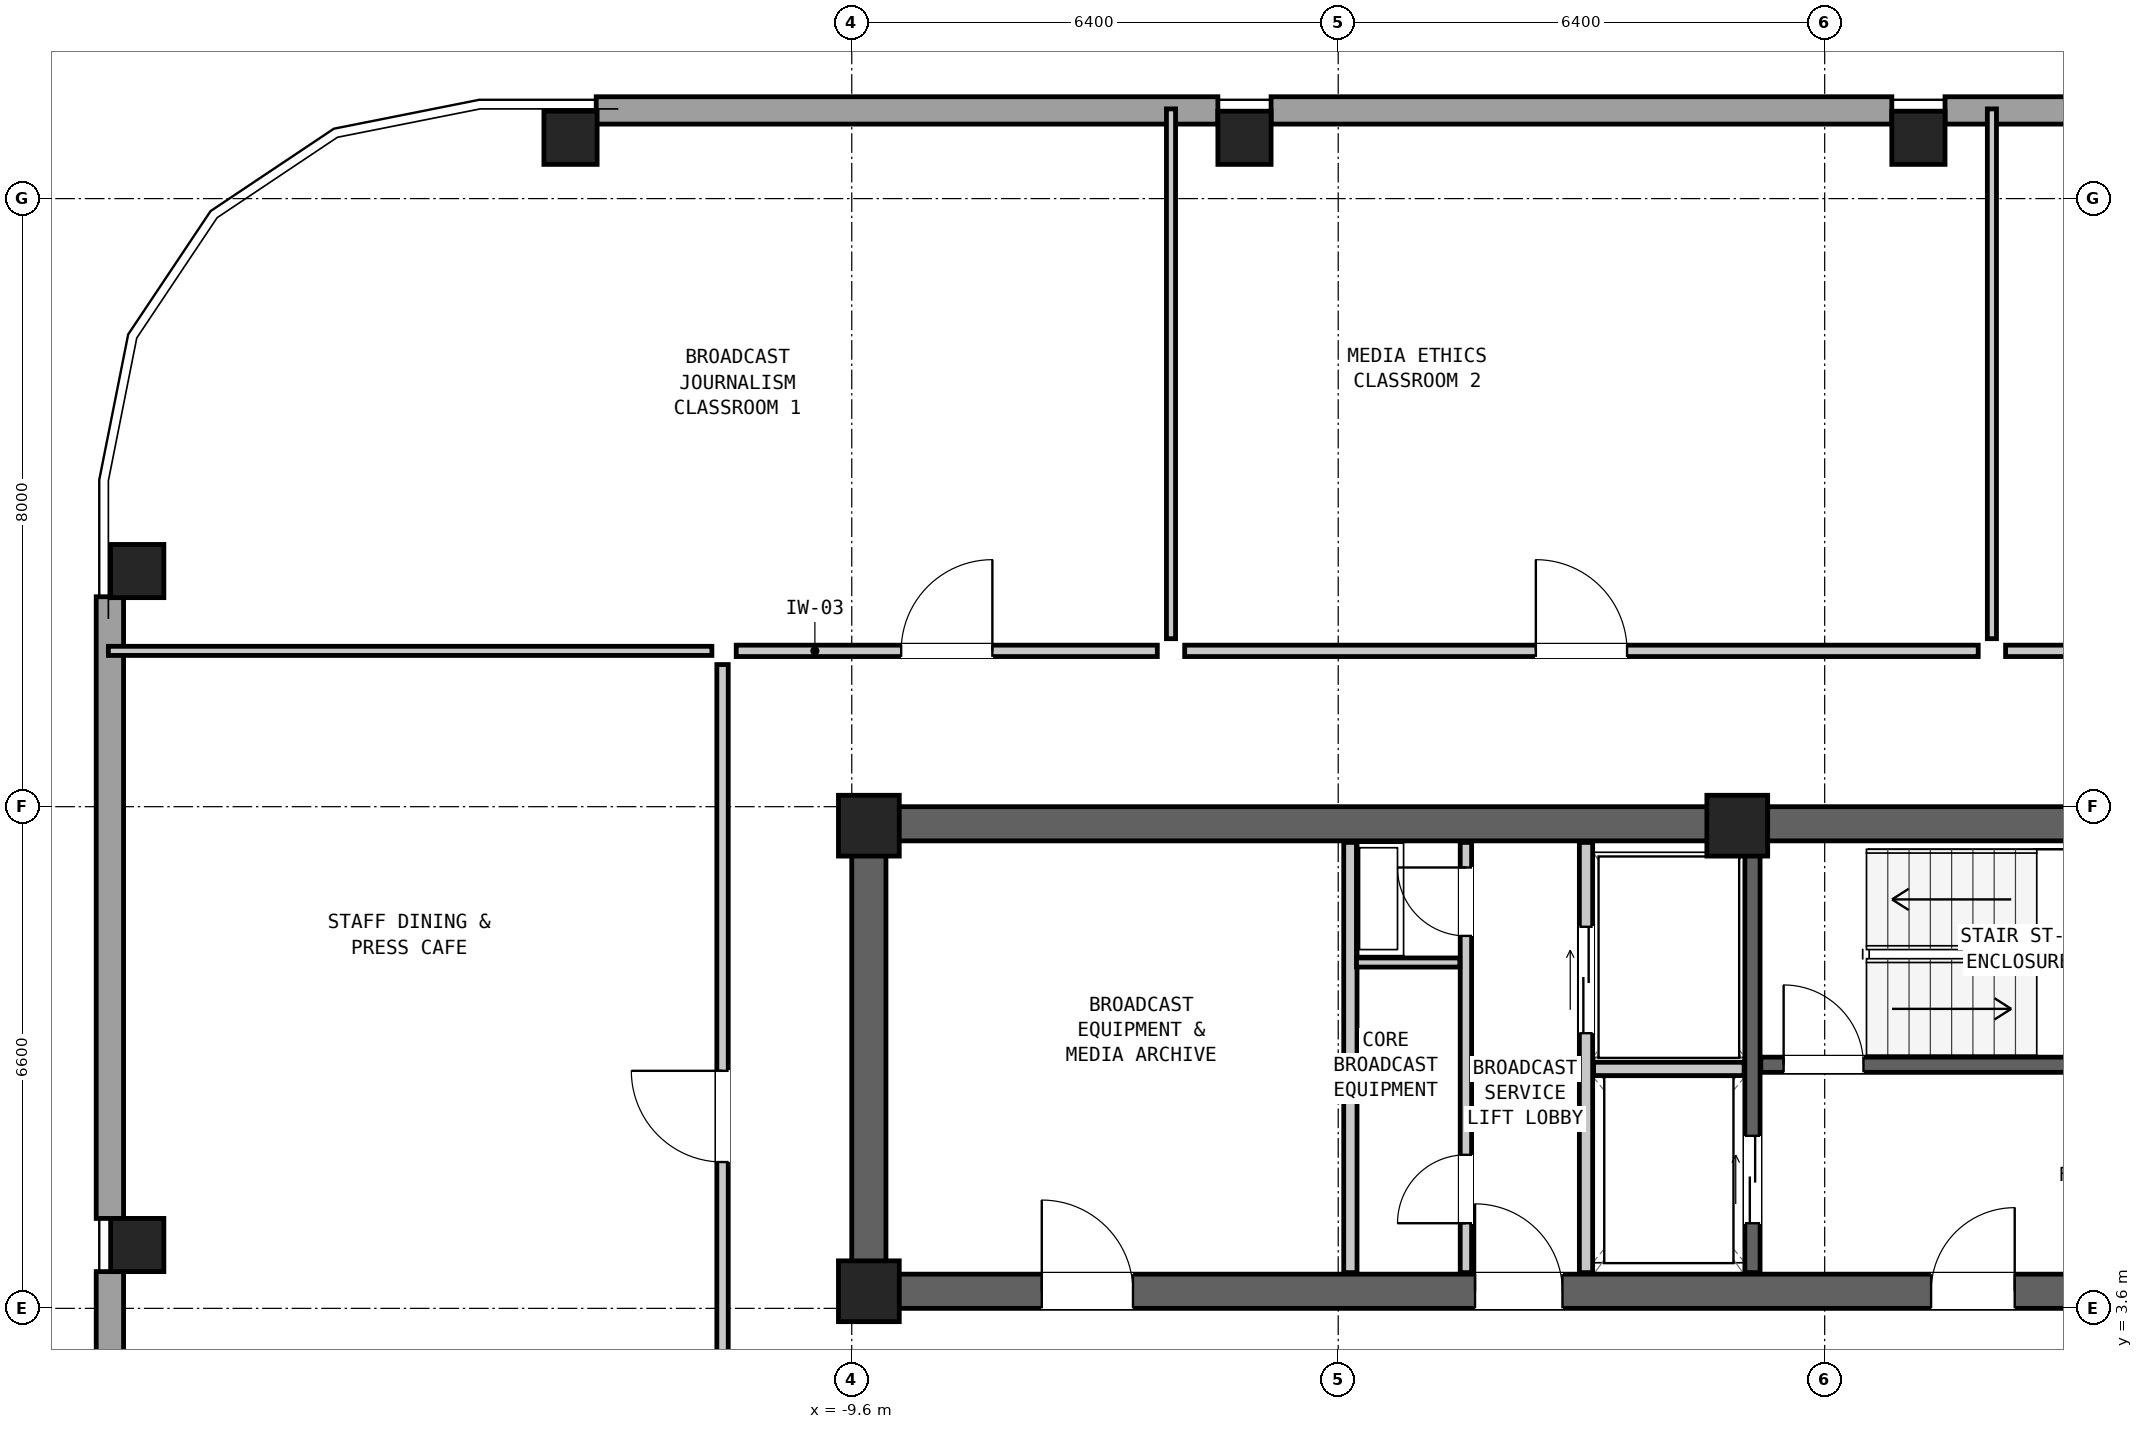
"""IFC4 building model, lengths in metres.
Left out: names, types, materials, properties, quantities, classifications, styles, units other than length and angle.
Written with IfcOpenShell. Run it as: python <this file> out.ifc"""

import sys

from ifc_helpers import new_model, si_unit, direction, frame, frame_2d, origin, origin_2d, place, context, subcontext, project, spatial, rectangle, hollow_rectangle, extrude, element, fill, save


model = new_model("IFC4")
c1 = context("Model", 3, precision=1e-05, world=origin(), true_north=direction((0.0, 1.0)))
c2 = subcontext(c1, "Body", "Model", "MODEL_VIEW")
j1 = project(units=[si_unit("LENGTHUNIT", "METRE"), si_unit("PLANEANGLEUNIT", "RADIAN")], contexts=[c1])
p1 = place(None, origin())
s1 = spatial("IfcSite", under=j1, at=p1, CompositionType="ELEMENT")
p2 = place(p1, origin())
s2 = spatial("IfcBuilding", under=s1, at=p2, CompositionType="ELEMENT")
p3 = place(p2, frame((0.0, 0.0, 223.9)))
s3 = spatial("IfcBuildingStorey", under=s2, at=p3, CompositionType="ELEMENT", Elevation=223.9)
p4 = place(p3, frame((-9.6, 9.975, 0.0), z_axis=(0.0, 0.0, 1.0), x_axis=(1.0, 0.0, 0.0)))
e1 = element("IfcWall", 1, at=p4, inside=s3, PredefinedType="SHEAR", context=c2, shape_type="SweptSolid", body=[
    extrude(rectangle(XDim=19.2, YDim=0.45, at=frame_2d((9.6, 0.0))), origin(), (0.0, 0.0, 1.0), 3.05),
])
p5 = place(p3, frame((-9.6, 3.825, 0.0), z_axis=(0.0, 0.0, 1.0), x_axis=(1.0, 0.0, 0.0)))
e2 = element("IfcWall", 2, at=p5, inside=s3, PredefinedType="SHEAR", context=c2, shape_type="SweptSolid", body=[
    extrude(rectangle(XDim=19.2, YDim=0.45, at=frame_2d((9.6, 0.0))), origin(), (0.0, 0.0, 1.0), 3.05),
])
p6 = place(p5, frame((14.2, 0.0, 0.0)))
e3 = element("IfcOpeningElement", 3, at=p6, cuts=e2, PredefinedType="OPENING", context=c2, shape_type="SweptSolid", body=[
    extrude(rectangle(XDim=1.1, YDim=2.08, at=frame_2d((0.55, 1.04))), frame((0.0, 0.237, 0.0), z_axis=(0.0, -1.0, 0.0), x_axis=(1.0, 0.0, 0.0)), (0.0, 0.0, 1.0), 0.474),
])
p7 = place(p5, frame((8.2, 0.0, 0.0)))
e4 = element("IfcOpeningElement", 4, at=p7, cuts=e2, PredefinedType="OPENING", context=c2, shape_type="SweptSolid", body=[
    extrude(rectangle(XDim=1.15, YDim=2.1, at=frame_2d((0.575, 1.05))), frame((0.0, 0.237, 0.0), z_axis=(0.0, -1.0, 0.0), x_axis=(1.0, 0.0, 0.0)), (0.0, 0.0, 1.0), 0.474),
])
p8 = place(p5, frame((2.5, 0.0, 0.0)))
e5 = element("IfcOpeningElement", 5, at=p8, cuts=e2, PredefinedType="OPENING", context=c2, shape_type="SweptSolid", body=[
    extrude(rectangle(XDim=1.2, YDim=2.1, at=frame_2d((0.6, 1.05))), frame((0.0, 0.237, 0.0), z_axis=(0.0, -1.0, 0.0), x_axis=(1.0, 0.0, 0.0)), (0.0, 0.0, 1.0), 0.474),
])
p9 = place(p3, frame((-9.375, 3.6, 0.0), z_axis=(0.0, 0.0, 1.0), x_axis=(0.0, 1.0, 0.0)))
e6 = element("IfcWall", 6, at=p9, inside=s3, PredefinedType="SHEAR", context=c2, shape_type="SweptSolid", body=[
    extrude(rectangle(XDim=6.6, YDim=0.45, at=frame_2d((3.3, 0.0))), origin(), (0.0, 0.0, 1.0), 3.05),
])
for number, where, z_axis, x_axis in (
    (7, (4.433, 19.0, 0.0), (0.0, 0.0, 1.0), (1.0, 0.0, 0.0)),
    (8, (-4.433, 19.0, 0.0), (0.0, 0.0, 1.0), (1.0, 0.0, 0.0)),
    (9, (-13.3, 19.0, 0.0), (0.0, 0.0, 1.0), (1.0, 0.0, 0.0)),
    (10, (-19.0, 13.3, 0.0), (0.0, 0.0, 1.0), (0.0, 1.0, 0.0)),
    (11, (-19.0, 4.433, 0.0), (0.0, 0.0, 1.0), (0.0, 1.0, 0.0)),
):
    element("IfcColumn", number, at=place(p3, frame(where, z_axis=z_axis, x_axis=x_axis)), inside=s3, PredefinedType="COLUMN", context=c2, shape_type="SweptSolid", body=[
        extrude(hollow_rectangle(XDim=0.7, YDim=0.7, WallThickness=0.045, at=origin_2d()), origin(), (0.0, 0.0, 1.0), 3.05),
    ])
for number, where, z_axis, x_axis in (
    (12, (-9.375, 9.95, 0.0), (0.0, 0.0, 1.0), (1.0, 0.0, 0.0)),
    (13, (2.05, 9.95, 0.0), (0.0, 0.0, 1.0), (1.0, 0.0, 0.0)),
    (14, (-9.375, 3.825, 0.0), (0.0, 0.0, 1.0), (1.0, 0.0, 0.0)),
):
    element("IfcColumn", number, at=place(p3, frame(where, z_axis=z_axis, x_axis=x_axis)), inside=s3, PredefinedType="COLUMN", context=c2, shape_type="SweptSolid", body=[
        extrude(rectangle(XDim=0.8, YDim=0.8, at=origin_2d()), origin(), (0.0, 0.0, 1.0), 3.05),
    ])
p10 = place(p3, frame((-12.962, 19.36, 0.0), z_axis=(0.0, 0.0, 1.0), x_axis=(1.0, 0.0, 0.0)))
e15 = element("IfcWall", 15, at=p10, inside=s3, PredefinedType="SOLIDWALL", context=c2, shape_type="SweptSolid", body=[
    extrude(rectangle(XDim=8.179, YDim=0.36, at=frame_2d((4.089, 0.0))), origin(), (0.0, 0.0, 1.0), 0.98),
])
p11 = place(p3, frame((-4.083, 19.36, 0.0), z_axis=(0.0, 0.0, 1.0), x_axis=(1.0, 0.0, 0.0)))
e16 = element("IfcWall", 16, at=p11, inside=s3, PredefinedType="SOLIDWALL", context=c2, shape_type="SweptSolid", body=[
    extrude(rectangle(XDim=8.167, YDim=0.36, at=frame_2d((4.083, 0.0))), origin(), (0.0, 0.0, 1.0), 0.98),
])
p12 = place(p3, frame((4.783, 19.36, 0.0), z_axis=(0.0, 0.0, 1.0), x_axis=(1.0, 0.0, 0.0)))
e17 = element("IfcWall", 17, at=p12, inside=s3, PredefinedType="SOLIDWALL", context=c2, shape_type="SweptSolid", body=[
    extrude(rectangle(XDim=8.179, YDim=0.36, at=frame_2d((4.089, 0.0))), origin(), (0.0, 0.0, 1.0), 0.98),
])
p13 = place(p3, frame((-19.36, -4.083, 0.0), z_axis=(0.0, 0.0, 1.0), x_axis=(0.0, 1.0, 0.0)))
e18 = element("IfcWall", 18, at=p13, inside=s3, PredefinedType="SOLIDWALL", context=c2, shape_type="SweptSolid", body=[
    extrude(rectangle(XDim=8.167, YDim=0.36, at=frame_2d((4.083, 0.0))), origin(), (0.0, 0.0, 1.0), 0.98),
])
p14 = place(p3, frame((-19.36, 4.783, 0.0), z_axis=(0.0, 0.0, 1.0), x_axis=(0.0, 1.0, 0.0)))
e19 = element("IfcWall", 19, at=p14, inside=s3, PredefinedType="SOLIDWALL", context=c2, shape_type="SweptSolid", body=[
    extrude(rectangle(XDim=8.179, YDim=0.36, at=frame_2d((4.089, 0.0))), origin(), (0.0, 0.0, 1.0), 0.98),
])
p15 = place(p3, frame((2.36, 6.805, 0.0), z_axis=(0.0, 0.0, 1.0), x_axis=(1.0, 0.0, 0.0)))
e20 = element("IfcWall", 20, at=p15, inside=s3, PredefinedType="SHEAR", context=c2, shape_type="SweptSolid", body=[
    extrude(rectangle(XDim=6.77, YDim=0.2, at=frame_2d((3.385, 0.0))), origin(), (0.0, 0.0, 1.0), 2.86),
])
p16 = place(p15, frame((0.3, 0.0, 0.0)))
e21 = element("IfcOpeningElement", 21, at=p16, cuts=e20, PredefinedType="OPENING", context=c2, shape_type="SweptSolid", body=[
    extrude(rectangle(XDim=1.05, YDim=2.08, at=frame_2d((0.525, 1.04))), frame((0.0, 0.112, 0.0), z_axis=(0.0, -1.0, 0.0), x_axis=(1.0, 0.0, 0.0)), (0.0, 0.0, 1.0), 0.224),
])
p17 = place(p3, frame((2.25, 4.07, 0.0), z_axis=(0.0, 0.0, 1.0), x_axis=(0.0, 1.0, 0.0)))
e22 = element("IfcWall", 22, at=p17, inside=s3, PredefinedType="SHEAR", context=c2, shape_type="SweptSolid", body=[
    extrude(rectangle(XDim=5.66, YDim=0.2, at=frame_2d((2.83, 0.0))), origin(), (0.0, 0.0, 1.0), 2.86),
])
p18 = place(p17, frame((0.65, 0.0, 0.0)))
e23 = element("IfcOpeningElement", 23, at=p18, cuts=e22, PredefinedType="OPENING", context=c2, shape_type="SweptSolid", body=[
    extrude(rectangle(XDim=1.15, YDim=2.08, at=frame_2d((0.575, 1.04))), frame((0.0, 0.112, 0.0), z_axis=(0.0, -1.0, 0.0), x_axis=(1.0, 0.0, 0.0)), (0.0, 0.0, 1.0), 0.224),
])
p19 = place(p3, frame((0.06, 4.07, 0.0), z_axis=(0.0, 0.0, 1.0), x_axis=(0.0, 1.0, 0.0)))
e24 = element("IfcWall", 24, at=p19, inside=s3, PredefinedType="PARTITIONING", context=c2, shape_type="SweptSolid", body=[
    extrude(rectangle(XDim=5.66, YDim=0.175, at=frame_2d((2.83, 0.0))), origin(), (0.0, 0.0, 1.0), 2.86),
])
p20 = place(p19, frame((3.15, 0.0, 0.0)))
e25 = element("IfcOpeningElement", 25, at=p20, cuts=e24, PredefinedType="OPENING", context=c2, shape_type="SweptSolid", body=[
    extrude(rectangle(XDim=1.4, YDim=2.12, at=frame_2d((0.7, 1.06))), frame((0.0, 0.1, 0.0), z_axis=(0.0, -1.0, 0.0), x_axis=(1.0, 0.0, 0.0)), (0.0, 0.0, 1.0), 0.199),
])
p21 = place(p3, frame((0.16, 6.75, 0.0), z_axis=(0.0, 0.0, 1.0), x_axis=(1.0, 0.0, 0.0)))
e26 = element("IfcWall", 26, at=p21, inside=s3, PredefinedType="PARTITIONING", context=c2, shape_type="SweptSolid", body=[
    extrude(rectangle(XDim=1.98, YDim=0.175, at=frame_2d((0.99, 0.0))), origin(), (0.0, 0.0, 1.0), 2.86),
])
p22 = place(p3, frame((-3.04, 4.07, 0.0), z_axis=(0.0, 0.0, 1.0), x_axis=(0.0, 1.0, 0.0)))
e27 = element("IfcWall", 27, at=p22, inside=s3, PredefinedType="PARTITIONING", context=c2, shape_type="SweptSolid", body=[
    extrude(rectangle(XDim=5.66, YDim=0.175, at=frame_2d((2.83, 0.0))), origin(), (0.0, 0.0, 1.0), 2.86),
])
p23 = place(p3, frame((-1.52, 4.07, 0.0), z_axis=(0.0, 0.0, 1.0), x_axis=(0.0, 1.0, 0.0)))
e28 = element("IfcWall", 28, at=p23, inside=s3, PredefinedType="PARTITIONING", context=c2, shape_type="SweptSolid", body=[
    extrude(rectangle(XDim=5.66, YDim=0.15, at=frame_2d((2.83, 0.0))), origin(), (0.0, 0.0, 1.0), 2.86),
])
p24 = place(p23, frame((4.43, 0.0, 0.0)))
e29 = element("IfcOpeningElement", 29, at=p24, cuts=e28, PredefinedType="OPENING", context=c2, shape_type="SweptSolid", body=[
    extrude(rectangle(XDim=0.9, YDim=2.05, at=frame_2d((0.45, 1.025))), frame((0.0, 0.087, 0.0), z_axis=(0.0, -1.0, 0.0), x_axis=(1.0, 0.0, 0.0)), (0.0, 0.0, 1.0), 0.174),
])
p25 = place(p23, frame((0.65, 0.0, 0.0)))
e30 = element("IfcOpeningElement", 30, at=p25, cuts=e28, PredefinedType="OPENING", context=c2, shape_type="SweptSolid", body=[
    extrude(rectangle(XDim=0.9, YDim=2.05, at=frame_2d((0.45, 1.025))), frame((0.0, 0.087, 0.0), z_axis=(0.0, -1.0, 0.0), x_axis=(1.0, 0.0, 0.0)), (0.0, 0.0, 1.0), 0.174),
])
p26 = place(p3, frame((-2.96, 8.15, 0.0), z_axis=(0.0, 0.0, 1.0), x_axis=(1.0, 0.0, 0.0)))
e31 = element("IfcWall", 31, at=p26, inside=s3, PredefinedType="PARTITIONING", context=c2, shape_type="SweptSolid", body=[
    extrude(rectangle(XDim=1.36, YDim=0.12, at=frame_2d((0.68, 0.0))), origin(), (0.0, 0.0, 1.0), 2.86),
])
p27 = place(p3, frame((-19.38, 12.25, 0.0), z_axis=(0.0, 0.0, 1.0), x_axis=(1.0, 0.0, 0.0)))
e32 = element("IfcWall", 32, at=p27, inside=s3, PredefinedType="PARTITIONING", context=c2, shape_type="SweptSolid", body=[
    extrude(rectangle(XDim=7.94, YDim=0.12, at=frame_2d((3.97, 0.0))), origin(), (0.0, 0.0, 1.0), 2.86),
])
for number, where, z_axis, x_axis in (
    (33, (-5.4, 12.41, 0.0), (0.0, 0.0, 1.0), (0.0, 1.0, 0.0)),
    (34, (5.4, 12.41, 0.0), (0.0, 0.0, 1.0), (0.0, 1.0, 0.0)),
):
    element("IfcWall", number, at=place(p3, frame(where, z_axis=z_axis, x_axis=x_axis)), inside=s3, PredefinedType="PARTITIONING", context=c2, shape_type="SweptSolid", body=[
        extrude(rectangle(XDim=6.97, YDim=0.12, at=frame_2d((3.485, 0.0))), origin(), (0.0, 0.0, 1.0), 2.86),
    ])
p28 = place(p3, frame((-11.12, 12.25, 0.0), z_axis=(0.0, 0.0, 1.0), x_axis=(1.0, 0.0, 0.0)))
e35 = element("IfcWall", 35, at=p28, inside=s3, PredefinedType="PARTITIONING", context=c2, shape_type="SweptSolid", body=[
    extrude(rectangle(XDim=5.54, YDim=0.15, at=frame_2d((2.77, 0.0))), origin(), (0.0, 0.0, 1.0), 2.86),
])
p29 = place(p28, frame((2.17, 0.0, 0.0)))
e36 = element("IfcOpeningElement", 36, at=p29, cuts=e35, PredefinedType="OPENING", context=c2, shape_type="SweptSolid", body=[
    extrude(rectangle(XDim=1.2, YDim=2.1, at=frame_2d((0.6, 1.05))), frame((0.0, 0.087, 0.0), z_axis=(0.0, -1.0, 0.0), x_axis=(1.0, 0.0, 0.0)), (0.0, 0.0, 1.0), 0.174),
])
p30 = place(p3, frame((-5.22, 12.25, 0.0), z_axis=(0.0, 0.0, 1.0), x_axis=(1.0, 0.0, 0.0)))
e37 = element("IfcWall", 37, at=p30, inside=s3, PredefinedType="PARTITIONING", context=c2, shape_type="SweptSolid", body=[
    extrude(rectangle(XDim=10.44, YDim=0.15, at=frame_2d((5.22, 0.0))), origin(), (0.0, 0.0, 1.0), 2.86),
])
p31 = place(p30, frame((4.62, 0.0, 0.0)))
e38 = element("IfcOpeningElement", 38, at=p31, cuts=e37, PredefinedType="OPENING", context=c2, shape_type="SweptSolid", body=[
    extrude(rectangle(XDim=1.2, YDim=2.1, at=frame_2d((0.6, 1.05))), frame((0.0, 0.087, 0.0), z_axis=(0.0, -1.0, 0.0), x_axis=(1.0, 0.0, 0.0)), (0.0, 0.0, 1.0), 0.174),
])
p32 = place(p3, frame((5.58, 12.25, 0.0), z_axis=(0.0, 0.0, 1.0), x_axis=(1.0, 0.0, 0.0)))
e39 = element("IfcWall", 39, at=p32, inside=s3, PredefinedType="PARTITIONING", context=c2, shape_type="SweptSolid", body=[
    extrude(rectangle(XDim=5.89, YDim=0.15, at=frame_2d((2.945, 0.0))), origin(), (0.0, 0.0, 1.0), 2.86),
])
p33 = place(p32, frame((2.145, 0.0, 0.0)))
e40 = element("IfcOpeningElement", 40, at=p33, cuts=e39, PredefinedType="OPENING", context=c2, shape_type="SweptSolid", body=[
    extrude(rectangle(XDim=1.2, YDim=2.1, at=frame_2d((0.6, 1.05))), frame((0.0, 0.087, 0.0), z_axis=(0.0, -1.0, 0.0), x_axis=(1.0, 0.0, 0.0)), (0.0, 0.0, 1.0), 0.174),
])
p34 = place(p3, frame((-11.3, 0.18, 0.0), z_axis=(0.0, 0.0, 1.0), x_axis=(0.0, 1.0, 0.0)))
e41 = element("IfcWall", 41, at=p34, inside=s3, PredefinedType="PARTITIONING", context=c2, shape_type="SweptSolid", body=[
    extrude(rectangle(XDim=11.89, YDim=0.15, at=frame_2d((5.945, 0.0))), origin(), (0.0, 0.0, 1.0), 2.86),
])
p35 = place(p34, frame((5.345, 0.0, 0.0)))
e42 = element("IfcOpeningElement", 42, at=p35, cuts=e41, PredefinedType="OPENING", context=c2, shape_type="SweptSolid", body=[
    extrude(rectangle(XDim=1.2, YDim=2.1, at=frame_2d((0.6, 1.05))), frame((0.0, 0.087, 0.0), z_axis=(0.0, -1.0, 0.0), x_axis=(1.0, 0.0, 0.0)), (0.0, 0.0, 1.0), 0.174),
])
p36 = place(p16, origin())
e43 = element("IfcDoor", 43, at=p36, inside=s3, OperationType="SINGLE_SWING_LEFT", PredefinedType="DOOR", context=c2, shape_type="SweptSolid", body=[
    extrude(rectangle(XDim=1.05, YDim=2.08, at=frame_2d((0.525, 1.04))), frame((0.0, 0.025, 0.0), z_axis=(0.0, -1.0, 0.0), x_axis=(1.0, 0.0, 0.0)), (0.0, 0.0, 1.0), 0.05),
])
fill(e21, e43)
p37 = place(p6, origin())
e44 = element("IfcDoor", 44, at=p37, inside=s3, OperationType="SINGLE_SWING_RIGHT", PredefinedType="DOOR", context=c2, shape_type="SweptSolid", body=[
    extrude(rectangle(XDim=1.1, YDim=2.08, at=frame_2d((0.55, 1.04))), frame((0.0, 0.025, 0.0), z_axis=(0.0, -1.0, 0.0), x_axis=(1.0, 0.0, 0.0)), (0.0, 0.0, 1.0), 0.05),
])
fill(e3, e44)
p38 = place(p18, origin())
e45 = element("IfcDoor", 45, at=p38, inside=s3, OperationType="DOUBLE_DOOR_SLIDING", PredefinedType="DOOR", context=c2, shape_type="SweptSolid", body=[
    extrude(rectangle(XDim=1.15, YDim=2.08, at=frame_2d((0.575, 1.04))), frame((0.0, 0.025, 0.0), z_axis=(0.0, -1.0, 0.0), x_axis=(1.0, 0.0, 0.0)), (0.0, 0.0, 1.0), 0.05),
])
fill(e23, e45)
p39 = place(p20, origin())
e46 = element("IfcDoor", 46, at=p39, inside=s3, OperationType="DOUBLE_DOOR_SLIDING", PredefinedType="DOOR", context=c2, shape_type="SweptSolid", body=[
    extrude(rectangle(XDim=1.4, YDim=2.12, at=frame_2d((0.7, 1.06))), frame((0.0, 0.025, 0.0), z_axis=(0.0, -1.0, 0.0), x_axis=(1.0, 0.0, 0.0)), (0.0, 0.0, 1.0), 0.05),
])
fill(e25, e46)
p40 = place(p7, origin())
e47 = element("IfcDoor", 47, at=p40, inside=s3, OperationType="SINGLE_SWING_LEFT", PredefinedType="DOOR", context=c2, shape_type="SweptSolid", body=[
    extrude(rectangle(XDim=1.15, YDim=2.1, at=frame_2d((0.575, 1.05))), frame((0.0, 0.025, 0.0), z_axis=(0.0, -1.0, 0.0), x_axis=(1.0, 0.0, 0.0)), (0.0, 0.0, 1.0), 0.05),
])
fill(e4, e47)
p41 = place(p24, origin())
e48 = element("IfcDoor", 48, at=p41, inside=s3, OperationType="SINGLE_SWING_RIGHT", PredefinedType="DOOR", context=c2, shape_type="SweptSolid", body=[
    extrude(rectangle(XDim=0.9, YDim=2.05, at=frame_2d((0.45, 1.025))), frame((0.0, 0.025, 0.0), z_axis=(0.0, -1.0, 0.0), x_axis=(1.0, 0.0, 0.0)), (0.0, 0.0, 1.0), 0.05),
])
fill(e29, e48)
p42 = place(p25, origin())
e49 = element("IfcDoor", 49, at=p42, inside=s3, OperationType="SINGLE_SWING_LEFT", PredefinedType="DOOR", context=c2, shape_type="SweptSolid", body=[
    extrude(rectangle(XDim=0.9, YDim=2.05, at=frame_2d((0.45, 1.025))), frame((0.0, 0.025, 0.0), z_axis=(0.0, -1.0, 0.0), x_axis=(1.0, 0.0, 0.0)), (0.0, 0.0, 1.0), 0.05),
])
fill(e30, e49)
p43 = place(p8, origin())
e50 = element("IfcDoor", 50, at=p43, inside=s3, OperationType="SINGLE_SWING_LEFT", PredefinedType="DOOR", context=c2, shape_type="SweptSolid", body=[
    extrude(rectangle(XDim=1.2, YDim=2.1, at=frame_2d((0.6, 1.05))), frame((0.0, 0.025, 0.0), z_axis=(0.0, -1.0, 0.0), x_axis=(1.0, 0.0, 0.0)), (0.0, 0.0, 1.0), 0.05),
])
fill(e5, e50)
p44 = place(p29, origin())
e51 = element("IfcDoor", 51, at=p44, inside=s3, OperationType="SINGLE_SWING_RIGHT", PredefinedType="DOOR", context=c2, shape_type="SweptSolid", body=[
    extrude(rectangle(XDim=1.2, YDim=2.1, at=frame_2d((0.6, 1.05))), frame((0.0, 0.025, 0.0), z_axis=(0.0, -1.0, 0.0), x_axis=(1.0, 0.0, 0.0)), (0.0, 0.0, 1.0), 0.05),
])
fill(e36, e51)
p45 = place(p31, origin())
e52 = element("IfcDoor", 52, at=p45, inside=s3, OperationType="SINGLE_SWING_LEFT", PredefinedType="DOOR", context=c2, shape_type="SweptSolid", body=[
    extrude(rectangle(XDim=1.2, YDim=2.1, at=frame_2d((0.6, 1.05))), frame((0.0, 0.025, 0.0), z_axis=(0.0, -1.0, 0.0), x_axis=(1.0, 0.0, 0.0)), (0.0, 0.0, 1.0), 0.05),
])
fill(e38, e52)
p46 = place(p35, origin())
e53 = element("IfcDoor", 53, at=p46, inside=s3, OperationType="SINGLE_SWING_RIGHT", PredefinedType="DOOR", context=c2, shape_type="SweptSolid", body=[
    extrude(rectangle(XDim=1.2, YDim=2.1, at=frame_2d((0.6, 1.05))), frame((0.0, 0.025, 0.0), z_axis=(0.0, -1.0, 0.0), x_axis=(1.0, 0.0, 0.0)), (0.0, 0.0, 1.0), 0.05),
])
fill(e42, e53)
save(model, sys.argv[1])
